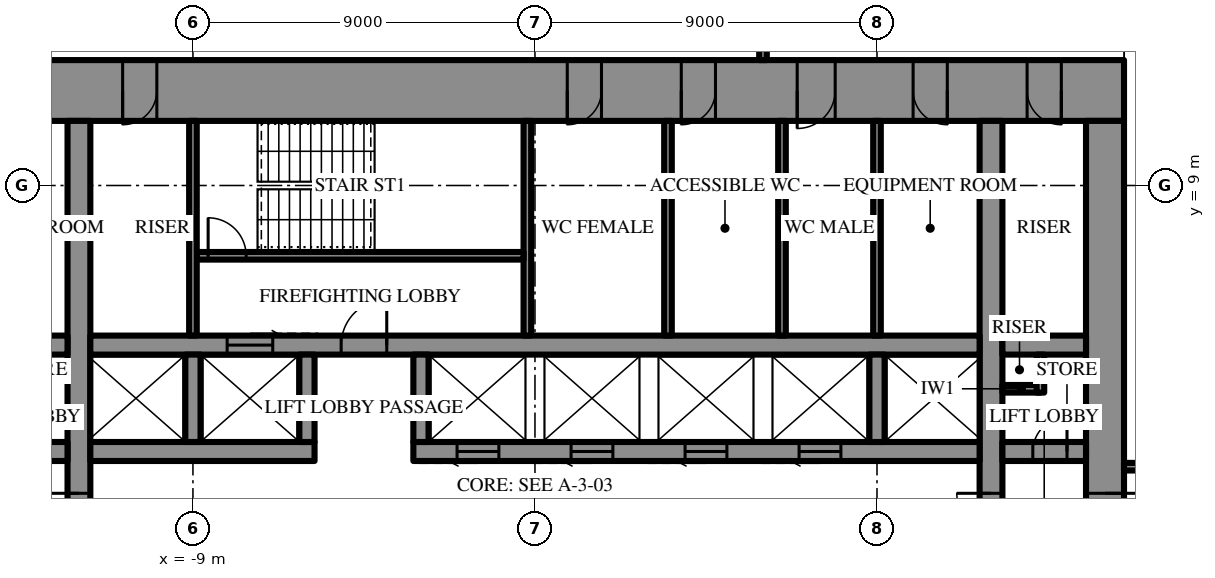
"""IFC4 building model, lengths in metres.
Left out: names, types, materials, properties, quantities, classifications, styles, units other than length and angle.
Written with IfcOpenShell. Run it as: python <this file> out.ifc"""

import sys

from ifc_helpers import new_model, si_unit, direction, frame, frame_2d, origin, place, context, subcontext, project, spatial, rectangle, extrude, element, fill, save


model = new_model("IFC4")
c1 = context("Model", 3, precision=1e-05, world=origin(), true_north=direction((0.0, 1.0)))
c2 = subcontext(c1, "Body", "Model", "MODEL_VIEW")
j1 = project(units=[si_unit("LENGTHUNIT", "METRE"), si_unit("PLANEANGLEUNIT", "RADIAN")], contexts=[c1])
p1 = place(None, origin())
s1 = spatial("IfcSite", under=j1, at=p1, CompositionType="ELEMENT")
p2 = place(p1, origin())
s2 = spatial("IfcBuilding", under=s1, at=p2, CompositionType="ELEMENT")
p3 = place(p2, frame((0.0, 0.0, 291.1)))
s3 = spatial("IfcBuildingStorey", under=s2, at=p3, CompositionType="ELEMENT", Elevation=291.1)
p4 = place(p3, frame((-15.5, 11.5, 0.0), z_axis=(0.0, 0.0, 1.0), x_axis=(1.0, 0.0, 0.0)))
e1 = element("IfcWall", 1, at=p4, inside=s3, PredefinedType="SHEAR", context=c2, shape_type="SweptSolid", body=[
    extrude(rectangle(XDim=31.0, YDim=1.6, at=frame_2d((15.5, 0.0))), origin(), (0.0, 0.0, 1.0), 4.2),
])
p5 = place(p4, frame((16.35, 0.0, 0.0)))
e2 = element("IfcOpeningElement", 2, at=p5, cuts=e1, PredefinedType="OPENING", context=c2, shape_type="SweptSolid", body=[
    extrude(rectangle(XDim=0.9, YDim=2.2, at=frame_2d((0.45, 1.1))), frame((0.0, 0.81, 0.0), z_axis=(0.0, -1.0, 0.0), x_axis=(1.0, 0.0, 0.0)), (0.0, 0.0, 1.0), 1.62),
])
p6 = place(p4, frame((19.35, 0.0, 0.0)))
e3 = element("IfcOpeningElement", 3, at=p6, cuts=e1, PredefinedType="OPENING", context=c2, shape_type="SweptSolid", body=[
    extrude(rectangle(XDim=0.9, YDim=2.2, at=frame_2d((0.45, 1.1))), frame((0.0, 0.81, 0.0), z_axis=(0.0, -1.0, 0.0), x_axis=(1.0, 0.0, 0.0)), (0.0, 0.0, 1.0), 1.62),
])
p7 = place(p4, frame((22.4, 0.0, 0.0)))
e4 = element("IfcOpeningElement", 4, at=p7, cuts=e1, PredefinedType="OPENING", context=c2, shape_type="SweptSolid", body=[
    extrude(rectangle(XDim=1.0, YDim=2.2, at=frame_2d((0.5, 1.1))), frame((0.0, 0.81, 0.0), z_axis=(0.0, -1.0, 0.0), x_axis=(1.0, 0.0, 0.0)), (0.0, 0.0, 1.0), 1.62),
])
p8 = place(p4, frame((1.65, 0.0, 0.0)))
e5 = element("IfcOpeningElement", 5, at=p8, cuts=e1, PredefinedType="OPENING", context=c2, shape_type="SweptSolid", body=[
    extrude(rectangle(XDim=0.9, YDim=2.2, at=frame_2d((0.45, 1.1))), frame((0.0, 0.81, 0.0), z_axis=(0.0, -1.0, 0.0), x_axis=(1.0, 0.0, 0.0)), (0.0, 0.0, 1.0), 1.62),
])
p9 = place(p4, frame((4.65, 0.0, 0.0)))
e6 = element("IfcOpeningElement", 6, at=p9, cuts=e1, PredefinedType="OPENING", context=c2, shape_type="SweptSolid", body=[
    extrude(rectangle(XDim=0.9, YDim=2.2, at=frame_2d((0.45, 1.1))), frame((0.0, 0.81, 0.0), z_axis=(0.0, -1.0, 0.0), x_axis=(1.0, 0.0, 0.0)), (0.0, 0.0, 1.0), 1.62),
])
p10 = place(p4, frame((25.45, 0.0, 0.0)))
e7 = element("IfcOpeningElement", 7, at=p10, cuts=e1, PredefinedType="OPENING", context=c2, shape_type="SweptSolid", body=[
    extrude(rectangle(XDim=0.9, YDim=2.2, at=frame_2d((0.45, 1.1))), frame((0.0, 0.81, 0.0), z_axis=(0.0, -1.0, 0.0), x_axis=(1.0, 0.0, 0.0)), (0.0, 0.0, 1.0), 1.62),
])
p11 = place(p4, frame((28.45, 0.0, 0.0)))
e8 = element("IfcOpeningElement", 8, at=p11, cuts=e1, PredefinedType="OPENING", context=c2, shape_type="SweptSolid", body=[
    extrude(rectangle(XDim=0.9, YDim=2.2, at=frame_2d((0.45, 1.1))), frame((0.0, 0.81, 0.0), z_axis=(0.0, -1.0, 0.0), x_axis=(1.0, 0.0, 0.0)), (0.0, 0.0, 1.0), 1.62),
])
p12 = place(p3, frame((15.0, -10.7, 0.0), z_axis=(0.0, 0.0, 1.0), x_axis=(0.0, 1.0, 0.0)))
e9 = element("IfcWall", 9, at=p12, inside=s3, PredefinedType="SHEAR", context=c2, shape_type="SweptSolid", body=[
    extrude(rectangle(XDim=21.4, YDim=1.0, at=frame_2d((10.7, 0.0))), origin(), (0.0, 0.0, 1.0), 4.2),
])
p13 = place(p12, frame((9.8, 0.0, 0.0)))
e10 = element("IfcOpeningElement", 10, at=p13, cuts=e9, PredefinedType="OPENING", context=c2, shape_type="SweptSolid", body=[
    extrude(rectangle(XDim=1.8, YDim=2.4, at=frame_2d((0.9, 1.2))), frame((0.0, 0.51, 0.0), z_axis=(0.0, -1.0, 0.0), x_axis=(1.0, 0.0, 0.0)), (0.0, 0.0, 1.0), 1.02),
])
p14 = place(p3, frame((12.0, -10.7, 0.0), z_axis=(0.0, 0.0, 1.0), x_axis=(0.0, 1.0, 0.0)))
e11 = element("IfcWall", 11, at=p14, inside=s3, PredefinedType="SHEAR", context=c2, shape_type="SweptSolid", body=[
    extrude(rectangle(XDim=21.4, YDim=0.6, at=frame_2d((10.7, 0.0))), origin(), (0.0, 0.0, 1.0), 4.2),
])
p15 = place(p14, frame((9.8, 0.0, 0.0)))
e12 = element("IfcOpeningElement", 12, at=p15, cuts=e11, PredefinedType="OPENING", context=c2, shape_type="SweptSolid", body=[
    extrude(rectangle(XDim=1.8, YDim=2.4, at=frame_2d((0.9, 1.2))), frame((0.0, 0.31, 0.0), z_axis=(0.0, -1.0, 0.0), x_axis=(1.0, 0.0, 0.0)), (0.0, 0.0, 1.0), 0.62),
])
p16 = place(p3, frame((-12.0, -10.7, 0.0), z_axis=(0.0, 0.0, 1.0), x_axis=(0.0, 1.0, 0.0)))
e13 = element("IfcWall", 13, at=p16, inside=s3, PredefinedType="SHEAR", context=c2, shape_type="SweptSolid", body=[
    extrude(rectangle(XDim=21.4, YDim=0.6, at=frame_2d((10.7, 0.0))), origin(), (0.0, 0.0, 1.0), 4.2),
])
p17 = place(p16, frame((9.8, 0.0, 0.0)))
e14 = element("IfcOpeningElement", 14, at=p17, cuts=e13, PredefinedType="OPENING", context=c2, shape_type="SweptSolid", body=[
    extrude(rectangle(XDim=1.8, YDim=2.4, at=frame_2d((0.9, 1.2))), frame((0.0, 0.31, 0.0), z_axis=(0.0, -1.0, 0.0), x_axis=(1.0, 0.0, 0.0)), (0.0, 0.0, 1.0), 0.62),
])
p18 = place(p3, frame((-14.5, 2.0, 0.0), z_axis=(0.0, 0.0, 1.0), x_axis=(1.0, 0.0, 0.0)))
e15 = element("IfcWall", 15, at=p18, inside=s3, PredefinedType="SHEAR", context=c2, shape_type="SweptSolid", body=[
    extrude(rectangle(XDim=2.2, YDim=0.5, at=frame_2d((1.1, 0.0))), origin(), (0.0, 0.0, 1.0), 4.2),
])
p19 = place(p18, frame((0.5, 0.0, 0.0)))
e16 = element("IfcOpeningElement", 16, at=p19, cuts=e15, PredefinedType="OPENING", context=c2, shape_type="SweptSolid", body=[
    extrude(rectangle(XDim=0.9, YDim=2.2, at=frame_2d((0.45, 1.1))), frame((0.0, 0.26, 0.0), z_axis=(0.0, -1.0, 0.0), x_axis=(1.0, 0.0, 0.0)), (0.0, 0.0, 1.0), 0.52),
])
p20 = place(p3, frame((-11.7, 2.0, 0.0), z_axis=(0.0, 0.0, 1.0), x_axis=(1.0, 0.0, 0.0)))
e17 = element("IfcWall", 17, at=p20, inside=s3, PredefinedType="SHEAR", context=c2, shape_type="SweptSolid", body=[
    extrude(rectangle(XDim=5.9, YDim=0.5, at=frame_2d((2.95, 0.0))), origin(), (0.0, 0.0, 1.0), 4.2),
])
p21 = place(p3, frame((-3.2, 2.0, 0.0), z_axis=(0.0, 0.0, 1.0), x_axis=(1.0, 0.0, 0.0)))
e18 = element("IfcWall", 18, at=p21, inside=s3, PredefinedType="SHEAR", context=c2, shape_type="SweptSolid", body=[
    extrude(rectangle(XDim=14.9, YDim=0.5, at=frame_2d((7.45, 0.0))), origin(), (0.0, 0.0, 1.0), 4.2),
])
p22 = place(p21, frame((1.15, 0.0, 0.0)))
e19 = element("IfcOpeningElement", 19, at=p22, cuts=e18, PredefinedType="OPENING", context=c2, shape_type="SweptSolid", body=[
    extrude(rectangle(XDim=1.1, YDim=2.2, at=frame_2d((0.55, 1.1))), frame((0.0, 0.26, 0.0), z_axis=(0.0, -1.0, 0.0), x_axis=(1.0, 0.0, 0.0)), (0.0, 0.0, 1.0), 0.52),
])
p23 = place(p21, frame((4.15, 0.0, 0.0)))
e20 = element("IfcOpeningElement", 20, at=p23, cuts=e18, PredefinedType="OPENING", context=c2, shape_type="SweptSolid", body=[
    extrude(rectangle(XDim=1.1, YDim=2.2, at=frame_2d((0.55, 1.1))), frame((0.0, 0.26, 0.0), z_axis=(0.0, -1.0, 0.0), x_axis=(1.0, 0.0, 0.0)), (0.0, 0.0, 1.0), 0.52),
])
p24 = place(p21, frame((7.15, 0.0, 0.0)))
e21 = element("IfcOpeningElement", 21, at=p24, cuts=e18, PredefinedType="OPENING", context=c2, shape_type="SweptSolid", body=[
    extrude(rectangle(XDim=1.1, YDim=2.2, at=frame_2d((0.55, 1.1))), frame((0.0, 0.26, 0.0), z_axis=(0.0, -1.0, 0.0), x_axis=(1.0, 0.0, 0.0)), (0.0, 0.0, 1.0), 0.52),
])
p25 = place(p21, frame((10.15, 0.0, 0.0)))
e22 = element("IfcOpeningElement", 22, at=p25, cuts=e18, PredefinedType="OPENING", context=c2, shape_type="SweptSolid", body=[
    extrude(rectangle(XDim=1.1, YDim=2.2, at=frame_2d((0.55, 1.1))), frame((0.0, 0.26, 0.0), z_axis=(0.0, -1.0, 0.0), x_axis=(1.0, 0.0, 0.0)), (0.0, 0.0, 1.0), 0.52),
])
p26 = place(p3, frame((12.3, 2.0, 0.0), z_axis=(0.0, 0.0, 1.0), x_axis=(1.0, 0.0, 0.0)))
e23 = element("IfcWall", 23, at=p26, inside=s3, PredefinedType="SHEAR", context=c2, shape_type="SweptSolid", body=[
    extrude(rectangle(XDim=2.2, YDim=0.5, at=frame_2d((1.1, 0.0))), origin(), (0.0, 0.0, 1.0), 4.2),
])
p27 = place(p26, frame((0.8, 0.0, 0.0)))
e24 = element("IfcOpeningElement", 24, at=p27, cuts=e23, PredefinedType="OPENING", context=c2, shape_type="SweptSolid", body=[
    extrude(rectangle(XDim=0.9, YDim=2.2, at=frame_2d((0.45, 1.1))), frame((0.0, 0.26, 0.0), z_axis=(0.0, -1.0, 0.0), x_axis=(1.0, 0.0, 0.0)), (0.0, 0.0, 1.0), 0.52),
])
p28 = place(p3, frame((-14.5, 4.8, 0.0), z_axis=(0.0, 0.0, 1.0), x_axis=(1.0, 0.0, 0.0)))
e25 = element("IfcWall", 25, at=p28, inside=s3, PredefinedType="SHEAR", context=c2, shape_type="SweptSolid", body=[
    extrude(rectangle(XDim=2.2, YDim=0.5, at=frame_2d((1.1, 0.0))), origin(), (0.0, 0.0, 1.0), 4.2),
])
p29 = place(p3, frame((-11.7, 4.8, 0.0), z_axis=(0.0, 0.0, 1.0), x_axis=(1.0, 0.0, 0.0)))
e26 = element("IfcWall", 26, at=p29, inside=s3, PredefinedType="SHEAR", context=c2, shape_type="SweptSolid", body=[
    extrude(rectangle(XDim=23.4, YDim=0.5, at=frame_2d((11.7, 0.0))), origin(), (0.0, 0.0, 1.0), 4.2),
])
p30 = place(p29, frame((6.6, 0.0, 0.0)))
e27 = element("IfcOpeningElement", 27, at=p30, cuts=e26, PredefinedType="OPENING", context=c2, shape_type="SweptSolid", body=[
    extrude(rectangle(XDim=1.2, YDim=2.2, at=frame_2d((0.6, 1.1))), frame((0.0, 0.26, 0.0), z_axis=(0.0, -1.0, 0.0), x_axis=(1.0, 0.0, 0.0)), (0.0, 0.0, 1.0), 0.52),
])
p31 = place(p29, frame((3.6, 0.0, 0.0)))
e28 = element("IfcOpeningElement", 28, at=p31, cuts=e26, PredefinedType="OPENING", context=c2, shape_type="SweptSolid", body=[
    extrude(rectangle(XDim=1.2, YDim=2.2, at=frame_2d((0.6, 1.1))), frame((0.0, 0.26, 0.0), z_axis=(0.0, -1.0, 0.0), x_axis=(1.0, 0.0, 0.0)), (0.0, 0.0, 1.0), 0.52),
])
p32 = place(p3, frame((12.3, 4.8, 0.0), z_axis=(0.0, 0.0, 1.0), x_axis=(1.0, 0.0, 0.0)))
e29 = element("IfcWall", 29, at=p32, inside=s3, PredefinedType="SHEAR", context=c2, shape_type="SweptSolid", body=[
    extrude(rectangle(XDim=2.2, YDim=0.5, at=frame_2d((1.1, 0.0))), origin(), (0.0, 0.0, 1.0), 4.2),
])
for number, where, z_axis, x_axis in (
    (30, (-9.0, 2.25, 0.0), (0.0, 0.0, 1.0), (0.0, 1.0, 0.0)),
    (31, (-6.0, 2.25, 0.0), (0.0, 0.0, 1.0), (0.0, 1.0, 0.0)),
    (32, (-3.0, 2.25, 0.0), (0.0, 0.0, 1.0), (0.0, 1.0, 0.0)),
    (33, (9.0, 2.25, 0.0), (0.0, 0.0, 1.0), (0.0, 1.0, 0.0)),
):
    element("IfcWall", number, at=place(p3, frame(where, z_axis=z_axis, x_axis=x_axis)), inside=s3, PredefinedType="SHEAR", context=c2, shape_type="SweptSolid", body=[
        extrude(rectangle(XDim=2.3, YDim=0.4, at=frame_2d((1.15, 0.0))), origin(), (0.0, 0.0, 1.0), 4.2),
    ])
p33 = place(p3, frame((-0.2, 5.05, 0.0), z_axis=(0.0, 0.0, 1.0), x_axis=(0.0, 1.0, 0.0)))
e34 = element("IfcWall", 34, at=p33, inside=s3, PredefinedType="SHEAR", context=c2, shape_type="SweptSolid", body=[
    extrude(rectangle(XDim=5.65, YDim=0.2, at=frame_2d((2.825, 0.0))), origin(), (0.0, 0.0, 1.0), 4.2),
])
p34 = place(p3, frame((-8.9, 7.15, 0.0), z_axis=(0.0, 0.0, 1.0), x_axis=(1.0, 0.0, 0.0)))
e35 = element("IfcWall", 35, at=p34, inside=s3, PredefinedType="SHEAR", context=c2, shape_type="SweptSolid", body=[
    extrude(rectangle(XDim=8.6, YDim=0.2, at=frame_2d((4.3, 0.0))), origin(), (0.0, 0.0, 1.0), 4.2),
])
p35 = place(p34, frame((0.3, 0.0, 0.0)))
e36 = element("IfcOpeningElement", 36, at=p35, cuts=e35, PredefinedType="OPENING", context=c2, shape_type="SweptSolid", body=[
    extrude(rectangle(XDim=1.0, YDim=2.2, at=frame_2d((0.5, 1.1))), frame((0.0, 0.11, 0.0), z_axis=(0.0, -1.0, 0.0), x_axis=(1.0, 0.0, 0.0)), (0.0, 0.0, 1.0), 0.22),
])
for number, where, z_axis, x_axis in (
    (37, (-9.0, 5.05, 0.0), (0.0, 0.0, 1.0), (0.0, 1.0, 0.0)),
    (38, (9.0, 5.05, 0.0), (0.0, 0.0, 1.0), (0.0, 1.0, 0.0)),
    (39, (3.5, 5.05, 0.0), (0.0, 0.0, 1.0), (0.0, 1.0, 0.0)),
    (40, (6.5, 5.05, 0.0), (0.0, 0.0, 1.0), (0.0, 1.0, 0.0)),
):
    element("IfcWall", number, at=place(p3, frame(where, z_axis=z_axis, x_axis=x_axis)), inside=s3, PredefinedType="PARTITIONING", context=c2, shape_type="SweptSolid", body=[
        extrude(rectangle(XDim=5.65, YDim=0.2, at=frame_2d((2.825, 0.0))), origin(), (0.0, 0.0, 1.0), 4.0),
    ])
for number, where, z_axis, x_axis in (
    (41, (12.3, 3.65, 0.0), (0.0, 0.0, 1.0), (1.0, 0.0, 0.0)),
    (42, (13.3, 3.55, 0.0), (0.0, 0.0, 1.0), (0.0, 1.0, 0.0)),
):
    element("IfcWall", number, at=place(p3, frame(where, z_axis=z_axis, x_axis=x_axis)), inside=s3, PredefinedType="PARTITIONING", context=c2, shape_type="SweptSolid", body=[
        extrude(rectangle(XDim=1.0, YDim=0.2, at=frame_2d((0.5, 0.0))), origin(), (0.0, 0.0, 1.0), 4.0),
    ])
p36 = place(p3, frame((22.711, 7.663, 0.0), z_axis=(0.0, 0.0, 1.0), x_axis=(-0.499989069193, 0.866031714597, 0.0)))
e43 = element("IfcWall", 43, at=p36, inside=s3, PredefinedType="PARTITIONING", context=c2, shape_type="SweptSolid", body=[
    extrude(rectangle(XDim=14.056, YDim=0.2, at=frame_2d((7.028, 0.0))), origin(), (0.0, 0.0, 1.0), 4.0),
])
p37 = place(p36, frame((6.528, 0.0, 0.0)))
e44 = element("IfcOpeningElement", 44, at=p37, cuts=e43, PredefinedType="OPENING", context=c2, shape_type="SweptSolid", body=[
    extrude(rectangle(XDim=1.0, YDim=2.2, at=frame_2d((0.5, 1.1))), frame((0.0, 0.11, 0.0), z_axis=(0.0, -1.0, 0.0), x_axis=(1.0, 0.0, 0.0)), (0.0, 0.0, 1.0), 0.22),
])
p38 = place(p3, frame((15.5, 1.6, 0.0), z_axis=(0.0, 0.0, 1.0), x_axis=(1.0, 0.0, 0.0)))
e45 = element("IfcWall", 45, at=p38, inside=s3, PredefinedType="PARTITIONING", context=c2, shape_type="SweptSolid", body=[
    extrude(rectangle(XDim=12.2, YDim=0.2, at=frame_2d((6.1, 0.0))), origin(), (0.0, 0.0, 1.0), 4.0),
])
p39 = place(p38, frame((8.04, 0.0, 0.0)))
e46 = element("IfcOpeningElement", 46, at=p39, cuts=e45, PredefinedType="OPENING", context=c2, shape_type="SweptSolid", body=[
    extrude(rectangle(XDim=1.0, YDim=2.2, at=frame_2d((0.5, 1.1))), frame((0.0, 0.11, 0.0), z_axis=(0.0, -1.0, 0.0), x_axis=(1.0, 0.0, 0.0)), (0.0, 0.0, 1.0), 0.22),
])
p40 = place(p3, frame((6.0, 12.3, 0.0), z_axis=(0.0, 0.0, 1.0), x_axis=(0.0, 1.0, 0.0)))
e47 = element("IfcWall", 47, at=p40, inside=s3, PredefinedType="PARTITIONING", context=c2, shape_type="SweptSolid", body=[
    extrude(rectangle(XDim=1.7, YDim=0.2, at=frame_2d((0.85, 0.0))), origin(), (0.0, 0.0, 1.0), 4.0),
])
p41 = place(p40, frame((0.35, 0.0, 0.0)))
e48 = element("IfcOpeningElement", 48, at=p41, cuts=e47, PredefinedType="OPENING", context=c2, shape_type="SweptSolid", body=[
    extrude(rectangle(XDim=1.0, YDim=2.2, at=frame_2d((0.5, 1.1))), frame((0.0, 0.11, 0.0), z_axis=(0.0, -1.0, 0.0), x_axis=(1.0, 0.0, 0.0)), (0.0, 0.0, 1.0), 0.22),
])
p42 = place(p13, frame((1.8, 0.0, 0.0), z_axis=(0.0, 0.0, 1.0), x_axis=(-1.0, 0.0, 0.0)))
e49 = element("IfcDoor", 49, at=p42, inside=s3, OperationType="DOUBLE_DOOR_SINGLE_SWING", PredefinedType="DOOR", context=c2, shape_type="SweptSolid", body=[
    extrude(rectangle(XDim=1.8, YDim=2.4, at=frame_2d((0.9, 1.2))), frame((0.0, 0.025, 0.0), z_axis=(0.0, -1.0, 0.0), x_axis=(1.0, 0.0, 0.0)), (0.0, 0.0, 1.0), 0.05),
])
fill(e10, e49)
p43 = place(p30, origin())
e50 = element("IfcDoor", 50, at=p43, inside=s3, OperationType="SINGLE_SWING_LEFT", PredefinedType="DOOR", context=c2, shape_type="SweptSolid", body=[
    extrude(rectangle(XDim=1.2, YDim=2.2, at=frame_2d((0.6, 1.1))), frame((0.0, 0.025, 0.0), z_axis=(0.0, -1.0, 0.0), x_axis=(1.0, 0.0, 0.0)), (0.0, 0.0, 1.0), 0.05),
])
fill(e27, e50)
p44 = place(p35, origin())
e51 = element("IfcDoor", 51, at=p44, inside=s3, OperationType="SINGLE_SWING_RIGHT", PredefinedType="DOOR", context=c2, shape_type="SweptSolid", body=[
    extrude(rectangle(XDim=1.0, YDim=2.2, at=frame_2d((0.5, 1.1))), frame((0.0, 0.025, 0.0), z_axis=(0.0, -1.0, 0.0), x_axis=(1.0, 0.0, 0.0)), (0.0, 0.0, 1.0), 0.05),
])
fill(e36, e51)
p45 = place(p5, frame((0.9, 0.0, 0.0), z_axis=(0.0, 0.0, 1.0), x_axis=(-1.0, 0.0, 0.0)))
e52 = element("IfcDoor", 52, at=p45, inside=s3, OperationType="SINGLE_SWING_LEFT", PredefinedType="DOOR", context=c2, shape_type="SweptSolid", body=[
    extrude(rectangle(XDim=0.9, YDim=2.2, at=frame_2d((0.45, 1.1))), frame((0.0, 0.025, 0.0), z_axis=(0.0, -1.0, 0.0), x_axis=(1.0, 0.0, 0.0)), (0.0, 0.0, 1.0), 0.05),
])
fill(e2, e52)
p46 = place(p6, frame((0.9, 0.0, 0.0), z_axis=(0.0, 0.0, 1.0), x_axis=(-1.0, 0.0, 0.0)))
e53 = element("IfcDoor", 53, at=p46, inside=s3, OperationType="SINGLE_SWING_LEFT", PredefinedType="DOOR", context=c2, shape_type="SweptSolid", body=[
    extrude(rectangle(XDim=0.9, YDim=2.2, at=frame_2d((0.45, 1.1))), frame((0.0, 0.025, 0.0), z_axis=(0.0, -1.0, 0.0), x_axis=(1.0, 0.0, 0.0)), (0.0, 0.0, 1.0), 0.05),
])
fill(e3, e53)
p47 = place(p7, frame((1.0, 0.0, 0.0), z_axis=(0.0, 0.0, 1.0), x_axis=(-1.0, 0.0, 0.0)))
e54 = element("IfcDoor", 54, at=p47, inside=s3, OperationType="SINGLE_SWING_LEFT", PredefinedType="DOOR", context=c2, shape_type="SweptSolid", body=[
    extrude(rectangle(XDim=1.0, YDim=2.2, at=frame_2d((0.5, 1.1))), frame((0.0, 0.025, 0.0), z_axis=(0.0, -1.0, 0.0), x_axis=(1.0, 0.0, 0.0)), (0.0, 0.0, 1.0), 0.05),
])
fill(e4, e54)
p48 = place(p9, frame((0.9, 0.0, 0.0), z_axis=(0.0, 0.0, 1.0), x_axis=(-1.0, 0.0, 0.0)))
e55 = element("IfcDoor", 55, at=p48, inside=s3, OperationType="SINGLE_SWING_LEFT", PredefinedType="DOOR", context=c2, shape_type="SweptSolid", body=[
    extrude(rectangle(XDim=0.9, YDim=2.2, at=frame_2d((0.45, 1.1))), frame((0.0, 0.025, 0.0), z_axis=(0.0, -1.0, 0.0), x_axis=(1.0, 0.0, 0.0)), (0.0, 0.0, 1.0), 0.05),
])
fill(e6, e55)
p49 = place(p10, frame((0.9, 0.0, 0.0), z_axis=(0.0, 0.0, 1.0), x_axis=(-1.0, 0.0, 0.0)))
e56 = element("IfcDoor", 56, at=p49, inside=s3, OperationType="SINGLE_SWING_RIGHT", PredefinedType="DOOR", context=c2, shape_type="SweptSolid", body=[
    extrude(rectangle(XDim=0.9, YDim=2.2, at=frame_2d((0.45, 1.1))), frame((0.0, 0.025, 0.0), z_axis=(0.0, -1.0, 0.0), x_axis=(1.0, 0.0, 0.0)), (0.0, 0.0, 1.0), 0.05),
])
fill(e7, e56)
p50 = place(p11, frame((0.9, 0.0, 0.0), z_axis=(0.0, 0.0, 1.0), x_axis=(-1.0, 0.0, 0.0)))
e57 = element("IfcDoor", 57, at=p50, inside=s3, OperationType="SINGLE_SWING_RIGHT", PredefinedType="DOOR", context=c2, shape_type="SweptSolid", body=[
    extrude(rectangle(XDim=0.9, YDim=2.2, at=frame_2d((0.45, 1.1))), frame((0.0, 0.025, 0.0), z_axis=(0.0, -1.0, 0.0), x_axis=(1.0, 0.0, 0.0)), (0.0, 0.0, 1.0), 0.05),
])
fill(e8, e57)
p51 = place(p27, origin())
e58 = element("IfcDoor", 58, at=p51, inside=s3, OperationType="SINGLE_SWING_LEFT", PredefinedType="DOOR", context=c2, shape_type="SweptSolid", body=[
    extrude(rectangle(XDim=0.9, YDim=2.2, at=frame_2d((0.45, 1.1))), frame((0.0, 0.025, 0.0), z_axis=(0.0, -1.0, 0.0), x_axis=(1.0, 0.0, 0.0)), (0.0, 0.0, 1.0), 0.05),
])
fill(e24, e58)
p52 = place(p15, origin())
e59 = element("IfcDoor", 59, at=p52, inside=s3, OperationType="DOUBLE_DOOR_SINGLE_SWING", PredefinedType="DOOR", context=c2, shape_type="SweptSolid", body=[
    extrude(rectangle(XDim=1.8, YDim=2.4, at=frame_2d((0.9, 1.2))), frame((0.0, 0.025, 0.0), z_axis=(0.0, -1.0, 0.0), x_axis=(1.0, 0.0, 0.0)), (0.0, 0.0, 1.0), 0.05),
])
fill(e12, e59)
p53 = place(p17, origin())
e60 = element("IfcDoor", 60, at=p53, inside=s3, OperationType="DOUBLE_DOOR_SINGLE_SWING", PredefinedType="DOOR", context=c2, shape_type="SweptSolid", body=[
    extrude(rectangle(XDim=1.8, YDim=2.4, at=frame_2d((0.9, 1.2))), frame((0.0, 0.025, 0.0), z_axis=(0.0, -1.0, 0.0), x_axis=(1.0, 0.0, 0.0)), (0.0, 0.0, 1.0), 0.05),
])
fill(e14, e60)
p54 = place(p31, origin())
e61 = element("IfcDoor", 61, at=p54, inside=s3, OperationType="SLIDING_TO_LEFT", PredefinedType="DOOR", context=c2, shape_type="SweptSolid", body=[
    extrude(rectangle(XDim=1.2, YDim=2.2, at=frame_2d((0.6, 1.1))), frame((0.0, 0.025, 0.0), z_axis=(0.0, -1.0, 0.0), x_axis=(1.0, 0.0, 0.0)), (0.0, 0.0, 1.0), 0.05),
])
fill(e28, e61)
p55 = place(p22, frame((1.1, 0.0, 0.0), z_axis=(0.0, 0.0, 1.0), x_axis=(-1.0, 0.0, 0.0)))
e62 = element("IfcDoor", 62, at=p55, inside=s3, OperationType="SLIDING_TO_LEFT", PredefinedType="DOOR", context=c2, shape_type="SweptSolid", body=[
    extrude(rectangle(XDim=1.1, YDim=2.2, at=frame_2d((0.55, 1.1))), frame((0.0, 0.025, 0.0), z_axis=(0.0, -1.0, 0.0), x_axis=(1.0, 0.0, 0.0)), (0.0, 0.0, 1.0), 0.05),
])
fill(e19, e62)
p56 = place(p23, frame((1.1, 0.0, 0.0), z_axis=(0.0, 0.0, 1.0), x_axis=(-1.0, 0.0, 0.0)))
e63 = element("IfcDoor", 63, at=p56, inside=s3, OperationType="SLIDING_TO_LEFT", PredefinedType="DOOR", context=c2, shape_type="SweptSolid", body=[
    extrude(rectangle(XDim=1.1, YDim=2.2, at=frame_2d((0.55, 1.1))), frame((0.0, 0.025, 0.0), z_axis=(0.0, -1.0, 0.0), x_axis=(1.0, 0.0, 0.0)), (0.0, 0.0, 1.0), 0.05),
])
fill(e20, e63)
p57 = place(p24, frame((1.1, 0.0, 0.0), z_axis=(0.0, 0.0, 1.0), x_axis=(-1.0, 0.0, 0.0)))
e64 = element("IfcDoor", 64, at=p57, inside=s3, OperationType="SLIDING_TO_LEFT", PredefinedType="DOOR", context=c2, shape_type="SweptSolid", body=[
    extrude(rectangle(XDim=1.1, YDim=2.2, at=frame_2d((0.55, 1.1))), frame((0.0, 0.025, 0.0), z_axis=(0.0, -1.0, 0.0), x_axis=(1.0, 0.0, 0.0)), (0.0, 0.0, 1.0), 0.05),
])
fill(e21, e64)
p58 = place(p25, frame((1.1, 0.0, 0.0), z_axis=(0.0, 0.0, 1.0), x_axis=(-1.0, 0.0, 0.0)))
e65 = element("IfcDoor", 65, at=p58, inside=s3, OperationType="SLIDING_TO_LEFT", PredefinedType="DOOR", context=c2, shape_type="SweptSolid", body=[
    extrude(rectangle(XDim=1.1, YDim=2.2, at=frame_2d((0.55, 1.1))), frame((0.0, 0.025, 0.0), z_axis=(0.0, -1.0, 0.0), x_axis=(1.0, 0.0, 0.0)), (0.0, 0.0, 1.0), 0.05),
])
fill(e22, e65)
save(model, sys.argv[1])
